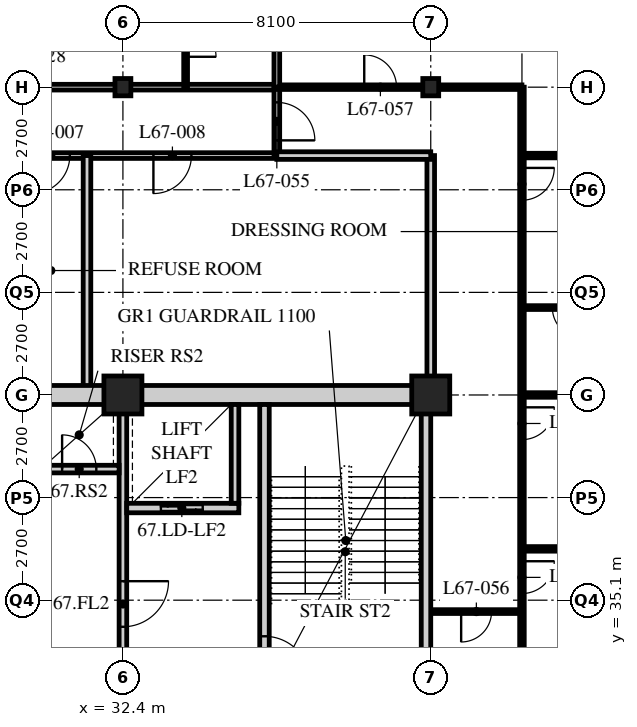
"""IFC4 building model, lengths in metres.
Left out: names, types, materials, properties, quantities, classifications, styles, units other than length and angle.
Written with IfcOpenShell. Run it as: python <this file> out.ifc"""

import sys

from ifc_helpers import new_model, si_unit, direction, frame, frame_2d, origin, origin_2d, place, context, subcontext, project, spatial, rectangle, hollow_rectangle, i_section, extrude, element, fill, save


model = new_model("IFC4")
c1 = context("Model", 3, precision=1e-05, world=origin(), true_north=direction((0.0, 1.0)))
c2 = subcontext(c1, "Body", "Model", "MODEL_VIEW")
j1 = project(units=[si_unit("LENGTHUNIT", "METRE"), si_unit("PLANEANGLEUNIT", "RADIAN")], contexts=[c1])
p1 = place(None, origin())
s1 = spatial("IfcSite", under=j1, at=p1, CompositionType="ELEMENT")
p2 = place(p1, origin())
s2 = spatial("IfcBuilding", under=s1, at=p2, CompositionType="ELEMENT")
p3 = place(p2, frame((0.0, 0.0, 261.9)))
s3 = spatial("IfcBuildingStorey", under=s2, at=p3, CompositionType="ELEMENT", Elevation=261.9)
p4 = place(p3, frame((32.4, 40.5, 0.0), z_axis=(0.0, 0.0, 1.0), x_axis=(1.0, 0.0, 0.0)))
e1 = element("IfcColumn", 1, at=p4, inside=s3, PredefinedType="COLUMN", context=c2, shape_type="SweptSolid", body=[
    extrude(hollow_rectangle(XDim=1.0, YDim=1.0, WallThickness=0.1, at=origin_2d()), origin(), (0.0, 0.0, 1.0), 3.9),
])
p5 = place(p3, frame((32.4, 48.6, 0.0), z_axis=(0.0, 0.0, 1.0), x_axis=(1.0, 0.0, 0.0)))
e2 = element("IfcColumn", 2, at=p5, inside=s3, PredefinedType="COLUMN", context=c2, shape_type="SweptSolid", body=[
    extrude(i_section(OverallWidth=0.418, OverallDepth=0.456, WebThickness=0.042, FlangeThickness=0.067, FilletRadius=0.015, at=origin_2d()), origin(), (0.0, 0.0, 1.0), 3.9),
])
p6 = place(p3, frame((40.5, 40.5, 0.0), z_axis=(0.0, 0.0, 1.0), x_axis=(1.0, 0.0, 0.0)))
e3 = element("IfcColumn", 3, at=p6, inside=s3, PredefinedType="COLUMN", context=c2, shape_type="SweptSolid", body=[
    extrude(hollow_rectangle(XDim=1.0, YDim=1.0, WallThickness=0.1, at=origin_2d()), origin(), (0.0, 0.0, 1.0), 3.9),
])
p7 = place(p3, frame((40.5, 48.6, 0.0), z_axis=(0.0, 0.0, 1.0), x_axis=(1.0, 0.0, 0.0)))
e4 = element("IfcColumn", 4, at=p7, inside=s3, PredefinedType="COLUMN", context=c2, shape_type="SweptSolid", body=[
    extrude(i_section(OverallWidth=0.418, OverallDepth=0.456, WebThickness=0.042, FlangeThickness=0.067, FilletRadius=0.015, at=origin_2d()), origin(), (0.0, 0.0, 1.0), 3.9),
])
p8 = place(p3, frame((8.1, 48.6, 0.0), z_axis=(0.0, 0.0, 1.0), x_axis=(1.0, 0.0, 0.0)))
e5 = element("IfcWall", 5, at=p8, inside=s3, PredefinedType="PARTITIONING", context=c2, shape_type="SweptSolid", body=[
    extrude(rectangle(XDim=28.35, YDim=0.15, at=frame_2d((14.175, 0.0))), origin(), (0.0, 0.0, 1.0), 3.078),
])
p9 = place(p8, frame((4.45, 0.0, 0.0)))
e6 = element("IfcOpeningElement", 6, at=p9, cuts=e5, PredefinedType="OPENING", context=c2, shape_type="SweptSolid", body=[
    extrude(rectangle(XDim=1.0, YDim=2.1, at=frame_2d((0.5, 1.05))), frame((0.0, 0.085, 0.0), z_axis=(0.0, -1.0, 0.0), x_axis=(1.0, 0.0, 0.0)), (0.0, 0.0, 1.0), 0.17),
])
p10 = place(p8, frame((20.65, 0.0, 0.0)))
e7 = element("IfcOpeningElement", 7, at=p10, cuts=e5, PredefinedType="OPENING", context=c2, shape_type="SweptSolid", body=[
    extrude(rectangle(XDim=1.0, YDim=2.1, at=frame_2d((0.5, 1.05))), frame((0.0, 0.085, 0.0), z_axis=(0.0, -1.0, 0.0), x_axis=(1.0, 0.0, 0.0)), (0.0, 0.0, 1.0), 0.17),
])
p11 = place(p8, frame((1.525, 0.0, 0.0)))
e8 = element("IfcOpeningElement", 8, at=p11, cuts=e5, PredefinedType="OPENING", context=c2, shape_type="SweptSolid", body=[
    extrude(rectangle(XDim=1.0, YDim=2.1, at=frame_2d((0.5, 1.05))), frame((0.0, 0.085, 0.0), z_axis=(0.0, -1.0, 0.0), x_axis=(1.0, 0.0, 0.0)), (0.0, 0.0, 1.0), 0.17),
])
p12 = place(p3, frame((29.56, 46.8, 0.0), z_axis=(0.0, 0.0, 1.0), x_axis=(1.0, 0.0, 0.0)))
e9 = element("IfcWall", 9, at=p12, inside=s3, PredefinedType="PARTITIONING", context=c2, shape_type="SweptSolid", body=[
    extrude(rectangle(XDim=6.89, YDim=0.15, at=frame_2d((3.445, 0.0))), origin(), (0.0, 0.0, 1.0), 3.69),
])
p13 = place(p12, frame((0.442, 0.0, 0.0)))
e10 = element("IfcOpeningElement", 10, at=p13, cuts=e9, PredefinedType="OPENING", context=c2, shape_type="SweptSolid", body=[
    extrude(rectangle(XDim=1.0, YDim=2.1, at=frame_2d((0.5, 1.05))), frame((0.0, 0.085, 0.0), z_axis=(0.0, -1.0, 0.0), x_axis=(1.0, 0.0, 0.0)), (0.0, 0.0, 1.0), 0.17),
])
p14 = place(p12, frame((3.642, 0.0, 0.0)))
e11 = element("IfcOpeningElement", 11, at=p14, cuts=e9, PredefinedType="OPENING", context=c2, shape_type="SweptSolid", body=[
    extrude(rectangle(XDim=1.0, YDim=2.1, at=frame_2d((0.5, 1.05))), frame((0.0, 0.085, 0.0), z_axis=(0.0, -1.0, 0.0), x_axis=(1.0, 0.0, 0.0)), (0.0, 0.0, 1.0), 0.17),
])
p15 = place(p3, frame((31.455, 46.8, 0.0), z_axis=(0.0, 0.0, 1.0), x_axis=(0.0, -1.0, 0.0)))
e12 = element("IfcWall", 12, at=p15, inside=s3, PredefinedType="SOLIDWALL", context=c2, shape_type="SweptSolid", body=[
    extrude(rectangle(XDim=6.3, YDim=0.2, at=frame_2d((3.15, 0.0))), origin(), (0.0, 0.0, 1.0), 3.69),
])
p16 = place(p3, frame((36.45, 46.8, 0.0), z_axis=(0.0, 0.0, 1.0), x_axis=(0.0, 1.0, 0.0)))
e13 = element("IfcWall", 13, at=p16, inside=s3, PredefinedType="PARTITIONING", context=c2, shape_type="SweptSolid", body=[
    extrude(rectangle(XDim=1.8, YDim=0.15, at=frame_2d((0.9, 0.0))), origin(), (0.0, 0.0, 1.0), 3.69),
])
p17 = place(p16, frame((0.4, 0.0, 0.0)))
e14 = element("IfcOpeningElement", 14, at=p17, cuts=e13, PredefinedType="OPENING", context=c2, shape_type="SweptSolid", body=[
    extrude(rectangle(XDim=1.0, YDim=2.1, at=frame_2d((0.5, 1.05))), frame((0.0, 0.085, 0.0), z_axis=(0.0, -1.0, 0.0), x_axis=(1.0, 0.0, 0.0)), (0.0, 0.0, 1.0), 0.17),
])
p18 = place(p3, frame((40.5, 40.5, 0.0), z_axis=(0.0, 0.0, 1.0), x_axis=(0.0, 1.0, 0.0)))
e15 = element("IfcWall", 15, at=p18, inside=s3, PredefinedType="SOLIDWALL", context=c2, shape_type="SweptSolid", body=[
    extrude(rectangle(XDim=6.3, YDim=0.2, at=frame_2d((3.15, 0.0))), origin(), (0.0, 0.0, 1.0), 3.078),
])
p19 = place(p3, frame((34.05, 48.6, 0.0), z_axis=(0.0, 0.0, 1.0), x_axis=(0.0, 1.0, 0.0)))
e16 = element("IfcWall", 16, at=p19, inside=s3, PredefinedType="PARTITIONING", context=c2, shape_type="SweptSolid", body=[
    extrude(rectangle(XDim=2.4, YDim=0.1, at=frame_2d((1.2, 0.0))), origin(), (0.0, 0.0, 1.0), 3.69),
])
p20 = place(p19, frame((0.8, 0.0, 0.0)))
e17 = element("IfcOpeningElement", 17, at=p20, cuts=e16, PredefinedType="OPENING", context=c2, shape_type="SweptSolid", body=[
    extrude(rectangle(XDim=0.8, YDim=2.1, at=frame_2d((0.4, 1.05))), frame((0.0, 0.06, 0.0), z_axis=(0.0, -1.0, 0.0), x_axis=(1.0, 0.0, 0.0)), (0.0, 0.0, 1.0), 0.12),
])
p21 = place(p3, frame((40.5, 34.8, 0.0), z_axis=(0.0, 0.0, 1.0), x_axis=(1.0, 0.0, 0.0)))
e18 = element("IfcWall", 18, at=p21, inside=s3, PredefinedType="PARTITIONING", context=c2, shape_type="SweptSolid", body=[
    extrude(rectangle(XDim=2.4, YDim=0.1, at=frame_2d((1.2, 0.0))), origin(), (0.0, 0.0, 1.0), 3.69),
])
p22 = place(p21, frame((0.8, 0.0, 0.0)))
e19 = element("IfcOpeningElement", 19, at=p22, cuts=e18, PredefinedType="OPENING", context=c2, shape_type="SweptSolid", body=[
    extrude(rectangle(XDim=0.8, YDim=2.1, at=frame_2d((0.4, 1.05))), frame((0.0, 0.06, 0.0), z_axis=(0.0, -1.0, 0.0), x_axis=(1.0, 0.0, 0.0)), (0.0, 0.0, 1.0), 0.12),
])
p23 = place(p3, frame((42.9, 48.6, 0.0), z_axis=(0.0, 0.0, 1.0), x_axis=(0.0, -1.0, 0.0)))
e20 = element("IfcWall", 20, at=p23, inside=s3, PredefinedType="PARTITIONING", context=c2, shape_type="SweptSolid", body=[
    extrude(rectangle(XDim=16.2, YDim=0.12, at=frame_2d((8.1, 0.0))), origin(), (0.0, 0.0, 1.0), 3.69),
])
p24 = place(p23, frame((2.125, 0.0, 0.0)))
e21 = element("IfcOpeningElement", 21, at=p24, cuts=e20, PredefinedType="OPENING", context=c2, shape_type="SweptSolid", body=[
    extrude(rectangle(XDim=0.85, YDim=2.1, at=frame_2d((0.425, 1.05))), frame((0.0, 0.07, 0.0), z_axis=(0.0, -1.0, 0.0), x_axis=(1.0, 0.0, 0.0)), (0.0, 0.0, 1.0), 0.14),
])
p25 = place(p23, frame((8.425, 0.0, 0.0)))
e22 = element("IfcOpeningElement", 22, at=p25, cuts=e20, PredefinedType="OPENING", context=c2, shape_type="SweptSolid", body=[
    extrude(rectangle(XDim=0.85, YDim=2.1, at=frame_2d((0.425, 1.05))), frame((0.0, 0.07, 0.0), z_axis=(0.0, -1.0, 0.0), x_axis=(1.0, 0.0, 0.0)), (0.0, 0.0, 1.0), 0.14),
])
p26 = place(p23, frame((12.475, 0.0, 0.0)))
e23 = element("IfcOpeningElement", 23, at=p26, cuts=e20, PredefinedType="OPENING", context=c2, shape_type="SweptSolid", body=[
    extrude(rectangle(XDim=0.85, YDim=2.1, at=frame_2d((0.425, 1.05))), frame((0.0, 0.07, 0.0), z_axis=(0.0, -1.0, 0.0), x_axis=(1.0, 0.0, 0.0)), (0.0, 0.0, 1.0), 0.14),
])
p27 = place(p3, frame((36.45, 48.6, 0.0), z_axis=(0.0, 0.0, 1.0), x_axis=(1.0, 0.0, 0.0)))
e24 = element("IfcWall", 24, at=p27, inside=s3, PredefinedType="PARTITIONING", context=c2, shape_type="SweptSolid", body=[
    extrude(rectangle(XDim=6.45, YDim=0.12, at=frame_2d((3.225, 0.0))), origin(), (0.0, 0.0, 1.0), 3.078),
])
p28 = place(p27, frame((2.3, 0.0, 0.0)))
e25 = element("IfcOpeningElement", 25, at=p28, cuts=e24, PredefinedType="OPENING", context=c2, shape_type="SweptSolid", body=[
    extrude(rectangle(XDim=0.85, YDim=2.1, at=frame_2d((0.425, 1.05))), frame((0.0, 0.07, 0.0), z_axis=(0.0, -1.0, 0.0), x_axis=(1.0, 0.0, 0.0)), (0.0, 0.0, 1.0), 0.14),
])
p29 = place(p3, frame((36.45, 46.8, 0.0), z_axis=(0.0, 0.0, 1.0), x_axis=(1.0, 0.0, 0.0)))
e26 = element("IfcWall", 26, at=p29, inside=s3, PredefinedType="SOLIDWALL", context=c2, shape_type="SweptSolid", body=[
    extrude(rectangle(XDim=4.05, YDim=0.2, at=frame_2d((2.025, 0.0))), origin(), (0.0, 0.0, 1.0), 3.69),
])
p30 = place(p3, frame((42.9, 46.8, 0.0), z_axis=(0.0, 0.0, 1.0), x_axis=(1.0, 0.0, 0.0)))
e27 = element("IfcWall", 27, at=p30, inside=s3, PredefinedType="PARTITIONING", context=c2, shape_type="SweptSolid", body=[
    extrude(rectangle(XDim=13.5, YDim=0.12, at=frame_2d((6.75, 0.0))), origin(), (0.0, 0.0, 1.0), 3.69),
])
p31 = place(p3, frame((36.45, 64.5, 0.0), z_axis=(0.0, 0.0, 1.0), x_axis=(0.0, -1.0, 0.0)))
e28 = element("IfcWall", 28, at=p31, inside=s3, PredefinedType="PARTITIONING", context=c2, shape_type="SweptSolid", body=[
    extrude(rectangle(XDim=15.9, YDim=0.15, at=frame_2d((7.95, 0.0))), origin(), (0.0, 0.0, 1.0), 3.69),
])
p32 = place(p3, frame((42.9, 42.8, 0.0), z_axis=(0.0, 0.0, 1.0), x_axis=(1.0, 0.0, 0.0)))
e29 = element("IfcWall", 29, at=p32, inside=s3, PredefinedType="PARTITIONING", context=c2, shape_type="SweptSolid", body=[
    extrude(rectangle(XDim=2.4, YDim=0.1, at=frame_2d((1.2, 0.0))), origin(), (0.0, 0.0, 1.0), 3.69),
])
p33 = place(p32, frame((0.8, 0.0, 0.0)))
e30 = element("IfcOpeningElement", 30, at=p33, cuts=e29, PredefinedType="OPENING", context=c2, shape_type="SweptSolid", body=[
    extrude(rectangle(XDim=0.8, YDim=2.1, at=frame_2d((0.4, 1.05))), frame((0.0, 0.06, 0.0), z_axis=(0.0, -1.0, 0.0), x_axis=(1.0, 0.0, 0.0)), (0.0, 0.0, 1.0), 0.12),
])
p34 = place(p3, frame((42.9, 40.5, 0.0), z_axis=(0.0, 0.0, 1.0), x_axis=(1.0, 0.0, 0.0)))
e31 = element("IfcWall", 31, at=p34, inside=s3, PredefinedType="PARTITIONING", context=c2, shape_type="SweptSolid", body=[
    extrude(rectangle(XDim=13.5, YDim=0.12, at=frame_2d((6.75, 0.0))), origin(), (0.0, 0.0, 1.0), 3.078),
])
p35 = place(p3, frame((42.9, 36.45, 0.0), z_axis=(0.0, 0.0, 1.0), x_axis=(1.0, 0.0, 0.0)))
e32 = element("IfcWall", 32, at=p35, inside=s3, PredefinedType="PARTITIONING", context=c2, shape_type="SweptSolid", body=[
    extrude(rectangle(XDim=13.5, YDim=0.12, at=frame_2d((6.75, 0.0))), origin(), (0.0, 0.0, 1.0), 3.69),
])
p36 = place(p3, frame((15.95, 40.5, 0.0), z_axis=(0.0, 0.0, 1.0), x_axis=(1.0, 0.0, 0.0)))
e33 = element("IfcWall", 33, at=p36, inside=s3, PredefinedType="SOLIDWALL", context=c2, shape_type="SweptSolid", body=[
    extrude(rectangle(XDim=24.55, YDim=0.5, at=frame_2d((12.275, 0.0))), origin(), (0.0, 0.0, 1.0), 3.04),
])
p37 = place(p36, frame((11.5, 0.0, 0.0)))
e34 = element("IfcOpeningElement", 34, at=p37, cuts=e33, PredefinedType="OPENING", context=c2, shape_type="SweptSolid", body=[
    extrude(rectangle(XDim=1.8, YDim=2.4, at=frame_2d((0.9, 1.2))), frame((0.0, 0.26, 0.0), z_axis=(0.0, -1.0, 0.0), x_axis=(1.0, 0.0, 0.0)), (0.0, 0.0, 1.0), 0.52),
])
p38 = place(p3, frame((40.375, 24.55, 0.0), z_axis=(0.0, 0.0, 1.0), x_axis=(0.0, 1.0, 0.0)))
e35 = element("IfcWall", 35, at=p38, inside=s3, PredefinedType="SOLIDWALL", context=c2, shape_type="SweptSolid", body=[
    extrude(rectangle(XDim=15.7, YDim=0.25, at=frame_2d((7.85, 0.0))), origin(), (0.0, 0.0, 1.0), 3.078),
])
p39 = place(p3, frame((32.4, 32.5, 0.0), z_axis=(0.0, 0.0, 1.0), x_axis=(0.0, 1.0, 0.0)))
e36 = element("IfcWall", 36, at=p39, inside=s3, PredefinedType="SOLIDWALL", context=c2, shape_type="SweptSolid", body=[
    extrude(rectangle(XDim=7.75, YDim=0.2, at=frame_2d((3.875, 0.0))), origin(), (0.0, 0.0, 1.0), 3.078),
])
p40 = place(p39, frame((1.9, 0.0, 0.0)))
e37 = element("IfcOpeningElement", 37, at=p40, cuts=e36, PredefinedType="OPENING", context=c2, shape_type="SweptSolid", body=[
    extrude(rectangle(XDim=1.2, YDim=2.1, at=frame_2d((0.6, 1.05))), frame((0.0, 0.11, 0.0), z_axis=(0.0, -1.0, 0.0), x_axis=(1.0, 0.0, 0.0)), (0.0, 0.0, 1.0), 0.22),
])
p41 = place(p3, frame((36.125, 32.5, 0.0), z_axis=(0.0, 0.0, 1.0), x_axis=(0.0, 1.0, 0.0)))
e38 = element("IfcWall", 38, at=p41, inside=s3, PredefinedType="SOLIDWALL", context=c2, shape_type="SweptSolid", body=[
    extrude(rectangle(XDim=7.75, YDim=0.25, at=frame_2d((3.875, 0.0))), origin(), (0.0, 0.0, 1.0), 3.69),
])
p42 = place(p41, frame((0.45, 0.0, 0.0)))
e39 = element("IfcOpeningElement", 39, at=p42, cuts=e38, PredefinedType="OPENING", context=c2, shape_type="SweptSolid", body=[
    extrude(rectangle(XDim=1.2, YDim=2.1, at=frame_2d((0.6, 1.05))), frame((0.0, 0.135, 0.0), z_axis=(0.0, -1.0, 0.0), x_axis=(1.0, 0.0, 0.0)), (0.0, 0.0, 1.0), 0.27),
])
p43 = place(p3, frame((32.5, 37.525, 0.0), z_axis=(0.0, 0.0, 1.0), x_axis=(1.0, 0.0, 0.0)))
e40 = element("IfcWall", 40, at=p43, inside=s3, PredefinedType="SOLIDWALL", context=c2, shape_type="SweptSolid", body=[
    extrude(rectangle(XDim=2.95, YDim=0.25, at=frame_2d((1.475, 0.0))), origin(), (0.0, 0.0, 1.0), 3.69),
])
p44 = place(p43, frame((0.9, 0.0, 0.0)))
e41 = element("IfcOpeningElement", 41, at=p44, cuts=e40, PredefinedType="OPENING", context=c2, shape_type="SweptSolid", body=[
    extrude(rectangle(XDim=1.1, YDim=2.4, at=frame_2d((0.55, 1.2))), frame((0.0, 0.135, 0.0), z_axis=(0.0, -1.0, 0.0), x_axis=(1.0, 0.0, 0.0)), (0.0, 0.0, 1.0), 0.27),
])
p45 = place(p3, frame((35.35, 37.65, 0.0), z_axis=(0.0, 0.0, 1.0), x_axis=(0.0, 1.0, 0.0)))
e42 = element("IfcWall", 42, at=p45, inside=s3, PredefinedType="SOLIDWALL", context=c2, shape_type="SweptSolid", body=[
    extrude(rectangle(XDim=2.6, YDim=0.2, at=frame_2d((1.3, 0.0))), origin(), (0.0, 0.0, 1.0), 3.69),
])
p46 = place(p3, frame((30.15, 38.55, 0.0), z_axis=(0.0, 0.0, 1.0), x_axis=(1.0, 0.0, 0.0)))
e43 = element("IfcWall", 43, at=p46, inside=s3, PredefinedType="SOLIDWALL", context=c2, shape_type="SweptSolid", body=[
    extrude(rectangle(XDim=2.15, YDim=0.2, at=frame_2d((1.075, 0.0))), origin(), (0.0, 0.0, 1.0), 3.69),
])
p47 = place(p46, frame((0.65, 0.0, 0.0)))
e44 = element("IfcOpeningElement", 44, at=p47, cuts=e43, PredefinedType="OPENING", context=c2, shape_type="SweptSolid", body=[
    extrude(rectangle(XDim=0.9, YDim=2.1, at=frame_2d((0.45, 1.05))), frame((0.0, 0.11, 0.0), z_axis=(0.0, -1.0, 0.0), x_axis=(1.0, 0.0, 0.0)), (0.0, 0.0, 1.0), 0.22),
])
p48 = place(p13, origin())
e45 = element("IfcDoor", 45, at=p48, inside=s3, OperationType="SINGLE_SWING_RIGHT", PredefinedType="DOOR", context=c2, shape_type="SweptSolid", body=[
    extrude(rectangle(XDim=1.0, YDim=2.1, at=frame_2d((0.5, 1.05))), frame((0.0, 0.025, 0.0), z_axis=(0.0, -1.0, 0.0), x_axis=(1.0, 0.0, 0.0)), (0.0, 0.0, 1.0), 0.05),
])
fill(e10, e45)
p49 = place(p14, origin())
e46 = element("IfcDoor", 46, at=p49, inside=s3, OperationType="SINGLE_SWING_RIGHT", PredefinedType="DOOR", context=c2, shape_type="SweptSolid", body=[
    extrude(rectangle(XDim=1.0, YDim=2.1, at=frame_2d((0.5, 1.05))), frame((0.0, 0.025, 0.0), z_axis=(0.0, -1.0, 0.0), x_axis=(1.0, 0.0, 0.0)), (0.0, 0.0, 1.0), 0.05),
])
fill(e11, e46)
p50 = place(p20, origin())
e47 = element("IfcDoor", 47, at=p50, inside=s3, OperationType="SINGLE_SWING_RIGHT", PredefinedType="DOOR", context=c2, shape_type="SweptSolid", body=[
    extrude(rectangle(XDim=0.8, YDim=2.1, at=frame_2d((0.4, 1.05))), frame((0.0, 0.025, 0.0), z_axis=(0.0, -1.0, 0.0), x_axis=(1.0, 0.0, 0.0)), (0.0, 0.0, 1.0), 0.05),
])
fill(e17, e47)
p51 = place(p17, origin())
e48 = element("IfcDoor", 48, at=p51, inside=s3, OperationType="SINGLE_SWING_RIGHT", PredefinedType="DOOR", context=c2, shape_type="SweptSolid", body=[
    extrude(rectangle(XDim=1.0, YDim=2.1, at=frame_2d((0.5, 1.05))), frame((0.0, 0.025, 0.0), z_axis=(0.0, -1.0, 0.0), x_axis=(1.0, 0.0, 0.0)), (0.0, 0.0, 1.0), 0.05),
])
fill(e14, e48)
p52 = place(p22, origin())
e49 = element("IfcDoor", 49, at=p52, inside=s3, OperationType="SINGLE_SWING_RIGHT", PredefinedType="DOOR", context=c2, shape_type="SweptSolid", body=[
    extrude(rectangle(XDim=0.8, YDim=2.1, at=frame_2d((0.4, 1.05))), frame((0.0, 0.025, 0.0), z_axis=(0.0, -1.0, 0.0), x_axis=(1.0, 0.0, 0.0)), (0.0, 0.0, 1.0), 0.05),
])
fill(e19, e49)
p53 = place(p28, origin())
e50 = element("IfcDoor", 50, at=p53, inside=s3, OperationType="SINGLE_SWING_LEFT", PredefinedType="DOOR", context=c2, shape_type="SweptSolid", body=[
    extrude(rectangle(XDim=0.85, YDim=2.1, at=frame_2d((0.425, 1.05))), frame((0.0, 0.025, 0.0), z_axis=(0.0, -1.0, 0.0), x_axis=(1.0, 0.0, 0.0)), (0.0, 0.0, 1.0), 0.05),
])
fill(e25, e50)
p54 = place(p33, origin())
e51 = element("IfcDoor", 51, at=p54, inside=s3, OperationType="SINGLE_SWING_LEFT", PredefinedType="DOOR", context=c2, shape_type="SweptSolid", body=[
    extrude(rectangle(XDim=0.8, YDim=2.1, at=frame_2d((0.4, 1.05))), frame((0.0, 0.025, 0.0), z_axis=(0.0, -1.0, 0.0), x_axis=(1.0, 0.0, 0.0)), (0.0, 0.0, 1.0), 0.05),
])
fill(e30, e51)
p55 = place(p24, origin())
e52 = element("IfcDoor", 52, at=p55, inside=s3, OperationType="SINGLE_SWING_LEFT", PredefinedType="DOOR", context=c2, shape_type="SweptSolid", body=[
    extrude(rectangle(XDim=0.85, YDim=2.1, at=frame_2d((0.425, 1.05))), frame((0.0, 0.025, 0.0), z_axis=(0.0, -1.0, 0.0), x_axis=(1.0, 0.0, 0.0)), (0.0, 0.0, 1.0), 0.05),
])
fill(e21, e52)
p56 = place(p25, origin())
e53 = element("IfcDoor", 53, at=p56, inside=s3, OperationType="SINGLE_SWING_LEFT", PredefinedType="DOOR", context=c2, shape_type="SweptSolid", body=[
    extrude(rectangle(XDim=0.85, YDim=2.1, at=frame_2d((0.425, 1.05))), frame((0.0, 0.025, 0.0), z_axis=(0.0, -1.0, 0.0), x_axis=(1.0, 0.0, 0.0)), (0.0, 0.0, 1.0), 0.05),
])
fill(e22, e53)
p57 = place(p26, origin())
e54 = element("IfcDoor", 54, at=p57, inside=s3, OperationType="SINGLE_SWING_LEFT", PredefinedType="DOOR", context=c2, shape_type="SweptSolid", body=[
    extrude(rectangle(XDim=0.85, YDim=2.1, at=frame_2d((0.425, 1.05))), frame((0.0, 0.025, 0.0), z_axis=(0.0, -1.0, 0.0), x_axis=(1.0, 0.0, 0.0)), (0.0, 0.0, 1.0), 0.05),
])
fill(e23, e54)
p58 = place(p42, origin())
e55 = element("IfcDoor", 55, at=p58, inside=s3, OperationType="SINGLE_SWING_RIGHT", PredefinedType="DOOR", context=c2, shape_type="SweptSolid", body=[
    extrude(rectangle(XDim=1.2, YDim=2.1, at=frame_2d((0.6, 1.05))), frame((0.0, 0.025, 0.0), z_axis=(0.0, -1.0, 0.0), x_axis=(1.0, 0.0, 0.0)), (0.0, 0.0, 1.0), 0.05),
])
fill(e39, e55)
p59 = place(p40, origin())
e56 = element("IfcDoor", 56, at=p59, inside=s3, OperationType="SINGLE_SWING_LEFT", PredefinedType="DOOR", context=c2, shape_type="SweptSolid", body=[
    extrude(rectangle(XDim=1.2, YDim=2.1, at=frame_2d((0.6, 1.05))), frame((0.0, 0.025, 0.0), z_axis=(0.0, -1.0, 0.0), x_axis=(1.0, 0.0, 0.0)), (0.0, 0.0, 1.0), 0.05),
])
fill(e37, e56)
p60 = place(p47, origin())
e57 = element("IfcDoor", 57, at=p60, inside=s3, OperationType="SINGLE_SWING_LEFT", PredefinedType="DOOR", context=c2, shape_type="SweptSolid", body=[
    extrude(rectangle(XDim=0.9, YDim=2.1, at=frame_2d((0.45, 1.05))), frame((0.0, 0.025, 0.0), z_axis=(0.0, -1.0, 0.0), x_axis=(1.0, 0.0, 0.0)), (0.0, 0.0, 1.0), 0.05),
])
fill(e44, e57)
p61 = place(p44, origin())
e58 = element("IfcDoor", 58, at=p61, inside=s3, OperationType="DOUBLE_DOOR_SLIDING", PredefinedType="DOOR", context=c2, shape_type="SweptSolid", body=[
    extrude(rectangle(XDim=1.1, YDim=2.4, at=frame_2d((0.55, 1.2))), frame((0.0, 0.025, 0.0), z_axis=(0.0, -1.0, 0.0), x_axis=(1.0, 0.0, 0.0)), (0.0, 0.0, 1.0), 0.05),
])
fill(e41, e58)
save(model, sys.argv[1])
